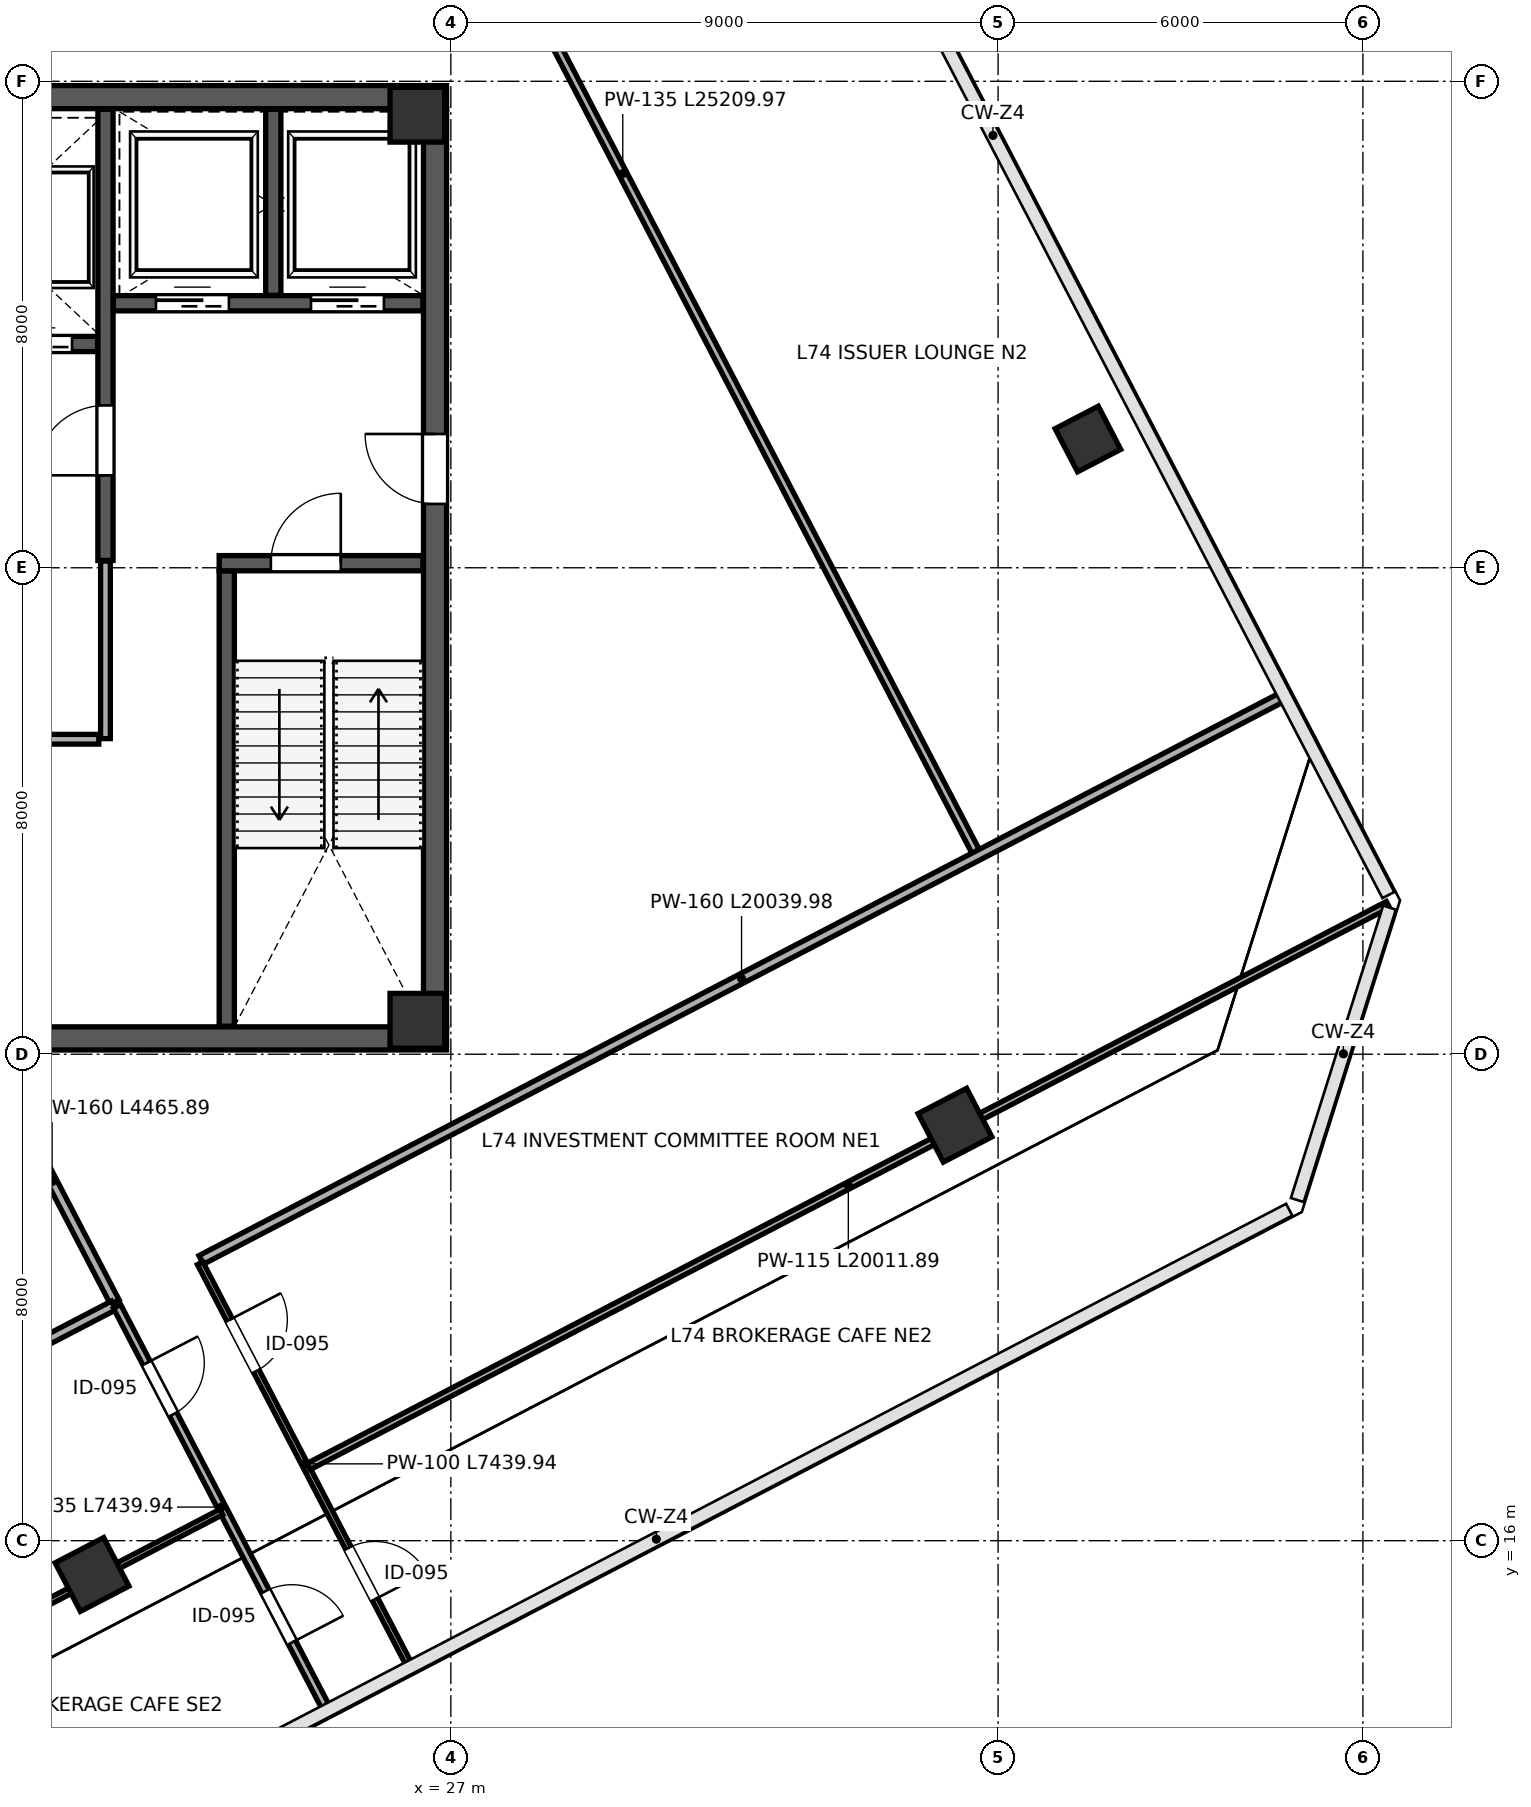
"""IFC4 building model, lengths in metres.
Left out: names, types, materials, properties, quantities, classifications, styles, units other than length and angle.
Written with IfcOpenShell. Run it as: python <this file> out.ifc"""

import sys

from ifc_helpers import new_model, si_unit, direction, frame, frame_2d, origin, origin_2d, place, context, subcontext, project, spatial, rectangle, extrude, source, transform, mapped, element, fill, save


model = new_model("IFC4")
c1 = context("Model", 3, precision=1e-05, world=origin(), true_north=direction((0.0, 1.0)))
c2 = subcontext(c1, "Body", "Model", "MODEL_VIEW")
j1 = project(units=[si_unit("LENGTHUNIT", "METRE"), si_unit("PLANEANGLEUNIT", "RADIAN")], contexts=[c1])
p1 = place(None, origin())
s1 = spatial("IfcSite", under=j1, at=p1, CompositionType="ELEMENT")
p2 = place(p1, origin())
s2 = spatial("IfcBuilding", under=s1, at=p2, CompositionType="ELEMENT")
p3 = place(p2, frame((0.0, 0.0, 328.2)))
s3 = spatial("IfcBuildingStorey", under=s2, at=p3, CompositionType="ELEMENT", Elevation=328.2)
m1 = source(origin(), c2, "Body", "SweptSolid", [
    extrude(rectangle(XDim=0.9, YDim=0.9, at=origin_2d()), origin(), (0.0, 0.0, 1.0), 4.198),
])
for number, where, z_axis, x_axis in (
    (1, (26.45, 24.55, 0.001), (0.0, 0.0, 1.0), (1.0, 0.0, 0.0)),
    (2, (26.45, 39.45, 0.001), (0.0, 0.0, 1.0), (1.0, 0.0, 0.0)),
):
    element("IfcColumn", number, at=place(p3, frame(where, z_axis=z_axis, x_axis=x_axis)), inside=s3, PredefinedType="COLUMN", context=c2, shape_type="MappedRepresentation", body=[
        mapped(m1, transform((0.0, 0.0, 0.0), scale=1.0)),
    ])
m2 = source(origin(), c2, "Body", "SweptSolid", [
    extrude(rectangle(XDim=0.8, YDim=0.8, at=origin_2d()), origin(), (0.0, 0.0, 1.0), 4.198),
])
p4 = place(p3, frame((37.478, 34.117, 0.001), z_axis=(0.0, 0.0, 1.0), x_axis=(-0.461748613235, 0.887010833178, 0.0)))
e3 = element("IfcColumn", 3, at=p4, inside=s3, PredefinedType="COLUMN", context=c2, shape_type="MappedRepresentation", body=[
    mapped(m2, transform((0.0, 0.0, 0.0), scale=1.0)),
])
m3 = source(origin(), c2, "Body", "SweptSolid", [
    extrude(rectangle(XDim=0.9, YDim=0.9, at=origin_2d()), origin(), (0.0, 0.0, 1.0), 4.198),
])
for number, where, z_axis, x_axis in (
    (4, (21.099, 15.444, 0.001), (0.0, 0.0, 1.0), (-0.462, 0.887, 0.0)),
    (5, (35.292, 22.832, 0.001), (0.0, 0.0, 1.0), (-0.462, 0.887, 0.0)),
):
    element("IfcColumn", number, at=place(p3, frame(where, z_axis=z_axis, x_axis=x_axis)), inside=s3, PredefinedType="COLUMN", context=c2, shape_type="MappedRepresentation", body=[
        mapped(m3, transform((0.0, 0.0, 0.0), scale=1.0)),
    ])
p5 = place(p3, frame((26.74, 24.45, 0.0), z_axis=(0.0, 0.0, 1.0), x_axis=(0.0, 1.0, 0.0)))
e6 = element("IfcWall", 6, at=p5, inside=s3, PredefinedType="SHEAR", context=c2, shape_type="SweptSolid", body=[
    extrude(rectangle(XDim=15.1, YDim=0.38, at=frame_2d((7.55, 0.0))), origin(), (0.0, 0.0, 1.0), 3.96),
])
p6 = place(p5, frame((8.6, 0.0, 0.0)))
e7 = element("IfcOpeningElement", 7, at=p6, cuts=e6, PredefinedType="OPENING", context=c2, shape_type="SweptSolid", body=[
    extrude(rectangle(XDim=1.15, YDim=2.2, at=frame_2d((0.575, 1.1))), frame((0.0, 0.2, 0.0), z_axis=(0.0, -1.0, 0.0), x_axis=(1.0, 0.0, 0.0)), (0.0, 0.0, 1.0), 0.4),
])
for number, where, z_axis, x_axis in (
    (8, (9.07, 24.26, 0.0), (0.0, 0.0, 1.0), (1.0, 0.0, 0.0)),
    (9, (9.07, 39.74, 0.0), (0.0, 0.0, 1.0), (1.0, 0.0, 0.0)),
):
    element("IfcWall", number, at=place(p3, frame(where, z_axis=z_axis, x_axis=x_axis)), inside=s3, PredefinedType="SHEAR", context=c2, shape_type="SweptSolid", body=[
        extrude(rectangle(XDim=17.86, YDim=0.38, at=frame_2d((8.93, 0.0))), origin(), (0.0, 0.0, 1.0), 3.96),
    ])
p7 = place(p3, frame((23.315, 24.46, 0.0), z_axis=(0.0, 0.0, 1.0), x_axis=(0.0, 1.0, 0.0)))
e10 = element("IfcWall", 10, at=p7, inside=s3, PredefinedType="SHEAR", context=c2, shape_type="SweptSolid", body=[
    extrude(rectangle(XDim=7.49, YDim=0.25, at=frame_2d((3.745, 0.0))), origin(), (0.0, 0.0, 1.0), 3.96),
])
p8 = place(p3, frame((23.19, 32.075, 0.0), z_axis=(0.0, 0.0, 1.0), x_axis=(1.0, 0.0, 0.0)))
e11 = element("IfcWall", 11, at=p8, inside=s3, PredefinedType="SHEAR", context=c2, shape_type="SweptSolid", body=[
    extrude(rectangle(XDim=3.35, YDim=0.25, at=frame_2d((1.675, 0.0))), origin(), (0.0, 0.0, 1.0), 3.96),
])
p9 = place(p8, frame((0.85, 0.0, 0.0)))
e12 = element("IfcOpeningElement", 12, at=p9, cuts=e11, PredefinedType="OPENING", context=c2, shape_type="SweptSolid", body=[
    extrude(rectangle(XDim=1.15, YDim=2.2, at=frame_2d((0.575, 1.1))), frame((0.0, 0.135, 0.0), z_axis=(0.0, -1.0, 0.0), x_axis=(1.0, 0.0, 0.0)), (0.0, 0.0, 1.0), 0.27),
])
p10 = place(p3, frame((21.32, 32.12, 0.0), z_axis=(0.0, 0.0, 1.0), x_axis=(0.0, 1.0, 0.0)))
e13 = element("IfcWall", 13, at=p10, inside=s3, PredefinedType="SHEAR", context=c2, shape_type="SweptSolid", body=[
    extrude(rectangle(XDim=7.42, YDim=0.25, at=frame_2d((3.71, 0.0))), origin(), (0.0, 0.0, 1.0), 3.96),
])
p11 = place(p10, frame((1.4, 0.0, 0.0)))
e14 = element("IfcOpeningElement", 14, at=p11, cuts=e13, PredefinedType="OPENING", context=c2, shape_type="SweptSolid", body=[
    extrude(rectangle(XDim=1.15, YDim=2.2, at=frame_2d((0.575, 1.1))), frame((0.0, 0.135, 0.0), z_axis=(0.0, -1.0, 0.0), x_axis=(1.0, 0.0, 0.0)), (0.0, 0.0, 1.0), 0.27),
])
p12 = place(p3, frame((21.45, 36.35, 0.0), z_axis=(0.0, 0.0, 1.0), x_axis=(1.0, 0.0, 0.0)))
e15 = element("IfcWall", 15, at=p12, inside=s3, PredefinedType="SHEAR", context=c2, shape_type="SweptSolid", body=[
    extrude(rectangle(XDim=5.09, YDim=0.25, at=frame_2d((2.545, 0.0))), origin(), (0.0, 0.0, 1.0), 3.96),
])
p13 = place(p12, frame((0.7, 0.0, 0.0)))
e16 = element("IfcOpeningElement", 16, at=p13, cuts=e15, PredefinedType="OPENING", context=c2, shape_type="SweptSolid", body=[
    extrude(rectangle(XDim=1.2, YDim=2.2, at=frame_2d((0.6, 1.1))), frame((0.0, 0.135, 0.0), z_axis=(0.0, -1.0, 0.0), x_axis=(1.0, 0.0, 0.0)), (0.0, 0.0, 1.0), 0.27),
])
p14 = place(p12, frame((3.25, 0.0, 0.0)))
e17 = element("IfcOpeningElement", 17, at=p14, cuts=e15, PredefinedType="OPENING", context=c2, shape_type="SweptSolid", body=[
    extrude(rectangle(XDim=1.2, YDim=2.2, at=frame_2d((0.6, 1.1))), frame((0.0, 0.135, 0.0), z_axis=(0.0, -1.0, 0.0), x_axis=(1.0, 0.0, 0.0)), (0.0, 0.0, 1.0), 0.27),
])
p15 = place(p3, frame((24.08, 36.48, 0.0), z_axis=(0.0, 0.0, 1.0), x_axis=(0.0, 1.0, 0.0)))
e18 = element("IfcWall", 18, at=p15, inside=s3, PredefinedType="SHEAR", context=c2, shape_type="SweptSolid", body=[
    extrude(rectangle(XDim=3.06, YDim=0.25, at=frame_2d((1.53, 0.0))), origin(), (0.0, 0.0, 1.0), 3.96),
])
p16 = place(p3, frame((17.32, 35.68, 0.0), z_axis=(0.0, 0.0, 1.0), x_axis=(1.0, 0.0, 0.0)))
e19 = element("IfcWall", 19, at=p16, inside=s3, PredefinedType="SHEAR", context=c2, shape_type="SweptSolid", body=[
    extrude(rectangle(XDim=3.87, YDim=0.25, at=frame_2d((1.935, 0.0))), origin(), (0.0, 0.0, 1.0), 3.96),
])
p17 = place(p16, frame((0.45, 0.0, 0.0)))
e20 = element("IfcOpeningElement", 20, at=p17, cuts=e19, PredefinedType="OPENING", context=c2, shape_type="SweptSolid", body=[
    extrude(rectangle(XDim=1.1, YDim=2.2, at=frame_2d((0.55, 1.1))), frame((0.0, 0.135, 0.0), z_axis=(0.0, -1.0, 0.0), x_axis=(1.0, 0.0, 0.0)), (0.0, 0.0, 1.0), 0.27),
])
p18 = place(p16, frame((2.35, 0.0, 0.0)))
e21 = element("IfcOpeningElement", 21, at=p18, cuts=e19, PredefinedType="OPENING", context=c2, shape_type="SweptSolid", body=[
    extrude(rectangle(XDim=1.1, YDim=2.2, at=frame_2d((0.55, 1.1))), frame((0.0, 0.135, 0.0), z_axis=(0.0, -1.0, 0.0), x_axis=(1.0, 0.0, 0.0)), (0.0, 0.0, 1.0), 0.27),
])
p19 = place(p3, frame((12.84, 29.18, 0.0), z_axis=(0.0, 0.0, 1.0), x_axis=(1.0, 0.0, 0.0)))
e22 = element("IfcWall", 22, at=p19, inside=s3, PredefinedType="PARTITIONING", context=c2, shape_type="SweptSolid", body=[
    extrude(rectangle(XDim=8.37, YDim=0.16, at=frame_2d((4.185, 0.0))), origin(), (0.0, 0.0, 1.0), 3.96),
])
p20 = place(p19, frame((2.1, 0.0, 0.0)))
e23 = element("IfcOpeningElement", 23, at=p20, cuts=e22, PredefinedType="OPENING", context=c2, shape_type="SweptSolid", body=[
    extrude(rectangle(XDim=0.9, YDim=2.15, at=frame_2d((0.45, 1.075))), frame((0.0, 0.09, 0.0), z_axis=(0.0, -1.0, 0.0), x_axis=(1.0, 0.0, 0.0)), (0.0, 0.0, 1.0), 0.18),
])
p21 = place(p19, frame((6.2, 0.0, 0.0)))
e24 = element("IfcOpeningElement", 24, at=p21, cuts=e22, PredefinedType="OPENING", context=c2, shape_type="SweptSolid", body=[
    extrude(rectangle(XDim=0.85, YDim=2.1, at=frame_2d((0.425, 1.05))), frame((0.0, 0.09, 0.0), z_axis=(0.0, -1.0, 0.0), x_axis=(1.0, 0.0, 0.0)), (0.0, 0.0, 1.0), 0.18),
])
p22 = place(p3, frame((21.32, 29.19, 0.0), z_axis=(0.0, 0.0, 1.0), x_axis=(0.0, 1.0, 0.0)))
e25 = element("IfcWall", 25, at=p22, inside=s3, PredefinedType="PARTITIONING", context=c2, shape_type="SweptSolid", body=[
    extrude(rectangle(XDim=2.92, YDim=0.16, at=frame_2d((1.46, 0.0))), origin(), (0.0, 0.0, 1.0), 3.96),
])
p23 = place(p3, frame((19.411, 23.885, 0.0), z_axis=(0.0, 0.0, 1.0), x_axis=(0.461717603384, -0.887026975196, 0.0)))
e26 = element("IfcWall", 26, at=p23, inside=s3, PredefinedType="PARTITIONING", context=c2, shape_type="SweptSolid", body=[
    extrude(rectangle(XDim=4.466, YDim=0.16, at=frame_2d((2.233, 0.0))), origin(), (0.0, 0.0, 1.0), 3.96),
])
p24 = place(p3, frame((24.007, 49.664, 0.0), z_axis=(0.0, 0.0, 1.0), x_axis=(0.461753963132, -0.887008048178, 0.0)))
e27 = element("IfcWall", 27, at=p24, inside=s3, PredefinedType="PARTITIONING", context=c2, shape_type="SweptSolid", body=[
    extrude(rectangle(XDim=25.21, YDim=0.135, at=frame_2d((12.605, 0.0))), origin(), (0.0, 0.0, 1.0), 3.96),
])
p25 = place(p24, frame((4.3, 0.0, 0.0)))
e28 = element("IfcOpeningElement", 28, at=p25, cuts=e27, PredefinedType="OPENING", context=c2, shape_type="SweptSolid", body=[
    extrude(rectangle(XDim=0.95, YDim=2.15, at=frame_2d((0.475, 1.075))), frame((0.0, 0.078, 0.0), z_axis=(0.0, -1.0, 0.0), x_axis=(1.0, 0.0, 0.0)), (0.0, 0.0, 1.0), 0.155),
])
p26 = place(p24, frame((8.3, 0.0, 0.0)))
e29 = element("IfcOpeningElement", 29, at=p26, cuts=e27, PredefinedType="OPENING", context=c2, shape_type="SweptSolid", body=[
    extrude(rectangle(XDim=0.95, YDim=2.15, at=frame_2d((0.475, 1.075))), frame((0.0, 0.078, 0.0), z_axis=(0.0, -1.0, 0.0), x_axis=(1.0, 0.0, 0.0)), (0.0, 0.0, 1.0), 0.155),
])
p27 = place(p3, frame((22.893, 20.617, 0.0), z_axis=(0.0, 0.0, 1.0), x_axis=(0.887013262899, 0.461743945755, 0.0)))
e30 = element("IfcWall", 30, at=p27, inside=s3, PredefinedType="PARTITIONING", context=c2, shape_type="SweptSolid", body=[
    extrude(rectangle(XDim=20.04, YDim=0.16, at=frame_2d((10.02, 0.0))), origin(), (0.0, 0.0, 1.0), 3.96),
])
p28 = place(p3, frame((13.136, 15.538, 0.0), z_axis=(0.0, 0.0, 1.0), x_axis=(0.887015145491, 0.461740329265, 0.0)))
e31 = element("IfcWall", 31, at=p28, inside=s3, PredefinedType="PARTITIONING", context=c2, shape_type="SweptSolid", body=[
    extrude(rectangle(XDim=9.38, YDim=0.16, at=frame_2d((4.69, 0.0))), origin(), (0.0, 0.0, 1.0), 3.96),
])
p29 = place(p3, frame((22.876, 20.563, 0.0), z_axis=(0.0, 0.0, 1.0), x_axis=(0.461750488306, -0.887009857076, 0.0)))
e32 = element("IfcWall", 32, at=p29, inside=s3, PredefinedType="PARTITIONING", context=c2, shape_type="SweptSolid", body=[
    extrude(rectangle(XDim=7.44, YDim=0.1, at=frame_2d((3.72, 0.0))), origin(), (0.0, 0.0, 1.0), 3.252),
])
p30 = place(p29, frame((1.05, 0.0, 0.0)))
e33 = element("IfcOpeningElement", 33, at=p30, cuts=e32, PredefinedType="OPENING", context=c2, shape_type="SweptSolid", body=[
    extrude(rectangle(XDim=0.95, YDim=2.15, at=frame_2d((0.475, 1.075))), frame((0.0, 0.06, 0.0), z_axis=(0.0, -1.0, 0.0), x_axis=(1.0, 0.0, 0.0)), (0.0, 0.0, 1.0), 0.12),
])
p31 = place(p29, frame((5.28, 0.0, 0.0)))
e34 = element("IfcOpeningElement", 34, at=p31, cuts=e32, PredefinedType="OPENING", context=c2, shape_type="SweptSolid", body=[
    extrude(rectangle(XDim=0.95, YDim=2.15, at=frame_2d((0.475, 1.075))), frame((0.0, 0.06, 0.0), z_axis=(0.0, -1.0, 0.0), x_axis=(1.0, 0.0, 0.0)), (0.0, 0.0, 1.0), 0.12),
])
p32 = place(p3, frame((21.51, 19.852, 0.0), z_axis=(0.0, 0.0, 1.0), x_axis=(0.461737048058, -0.887016853532, 0.0)))
e35 = element("IfcWall", 35, at=p32, inside=s3, PredefinedType="PARTITIONING", context=c2, shape_type="SweptSolid", body=[
    extrude(rectangle(XDim=7.44, YDim=0.135, at=frame_2d((3.72, 0.0))), origin(), (0.0, 0.0, 1.0), 3.252),
])
p33 = place(p32, frame((1.05, 0.0, 0.0)))
e36 = element("IfcOpeningElement", 36, at=p33, cuts=e35, PredefinedType="OPENING", context=c2, shape_type="SweptSolid", body=[
    extrude(rectangle(XDim=0.95, YDim=2.15, at=frame_2d((0.475, 1.075))), frame((0.0, 0.078, 0.0), z_axis=(0.0, -1.0, 0.0), x_axis=(1.0, 0.0, 0.0)), (0.0, 0.0, 1.0), 0.155),
])
p34 = place(p32, frame((5.28, 0.0, 0.0)))
e37 = element("IfcOpeningElement", 37, at=p34, cuts=e35, PredefinedType="OPENING", context=c2, shape_type="SweptSolid", body=[
    extrude(rectangle(XDim=0.95, YDim=2.15, at=frame_2d((0.475, 1.075))), frame((0.0, 0.078, 0.0), z_axis=(0.0, -1.0, 0.0), x_axis=(1.0, 0.0, 0.0)), (0.0, 0.0, 1.0), 0.155),
])
p35 = place(p3, frame((24.662, 17.22, 0.0), z_axis=(0.0, 0.0, 1.0), x_axis=(0.887015173056, 0.461740276312, 0.0)))
e38 = element("IfcWall", 38, at=p35, inside=s3, PredefinedType="PARTITIONING", context=c2, shape_type="SweptSolid", body=[
    extrude(rectangle(XDim=20.012, YDim=0.115, at=frame_2d((10.006, 0.0))), origin(), (0.0, 0.0, 1.0), 2.795),
])
p36 = place(p3, frame((14.93, 12.154, 0.0), z_axis=(0.0, 0.0, 1.0), x_axis=(0.887014112301, 0.461742314044, 0.0)))
e39 = element("IfcWall", 39, at=p36, inside=s3, PredefinedType="PARTITIONING", context=c2, shape_type="SweptSolid", body=[
    extrude(rectangle(XDim=9.352, YDim=0.1, at=frame_2d((4.676, 0.0))), origin(), (0.0, 0.0, 1.0), 2.795),
])
m4 = source(origin(), c2, "Body", "SweptSolid", [
    extrude(rectangle(XDim=1.15, YDim=2.2, at=frame_2d((0.575, 1.1))), frame((0.0, 0.025, 0.0), z_axis=(0.0, -1.0, 0.0), x_axis=(1.0, 0.0, 0.0)), (0.0, 0.0, 1.0), 0.05),
])
p37 = place(p11, origin())
e40 = element("IfcDoor", 40, at=p37, inside=s3, OperationType="SINGLE_SWING_LEFT", PredefinedType="DOOR", context=c2, shape_type="MappedRepresentation", body=[
    mapped(m4, transform((0.0, 0.0, 0.0), scale=1.0)),
])
fill(e14, e40)
m5 = source(origin(), c2, "Body", "SweptSolid", [
    extrude(rectangle(XDim=1.15, YDim=2.2, at=frame_2d((0.575, 1.1))), frame((0.0, 0.025, 0.0), z_axis=(0.0, -1.0, 0.0), x_axis=(1.0, 0.0, 0.0)), (0.0, 0.0, 1.0), 0.05),
])
p38 = place(p9, origin())
e41 = element("IfcDoor", 41, at=p38, inside=s3, OperationType="SINGLE_SWING_RIGHT", PredefinedType="DOOR", context=c2, shape_type="MappedRepresentation", body=[
    mapped(m5, transform((0.0, 0.0, 0.0), scale=1.0)),
])
fill(e12, e41)
p39 = place(p6, origin())
e42 = element("IfcDoor", 42, at=p39, inside=s3, OperationType="SINGLE_SWING_RIGHT", PredefinedType="DOOR", context=c2, shape_type="MappedRepresentation", body=[
    mapped(m4, transform((0.0, 0.0, 0.0), scale=1.0)),
])
fill(e7, e42)
m6 = source(origin(), c2, "Body", "SweptSolid", [
    extrude(rectangle(XDim=1.1, YDim=2.2, at=frame_2d((0.55, 1.1))), frame((0.0, 0.025, 0.0), z_axis=(0.0, -1.0, 0.0), x_axis=(1.0, 0.0, 0.0)), (0.0, 0.0, 1.0), 0.05),
])
p40 = place(p18, origin())
e43 = element("IfcDoor", 43, at=p40, inside=s3, OperationType="SLIDING_TO_RIGHT", PredefinedType="DOOR", context=c2, shape_type="MappedRepresentation", body=[
    mapped(m6, transform((0.0, 0.0, 0.0), scale=1.0)),
])
fill(e21, e43)
m7 = source(origin(), c2, "Body", "SweptSolid", [
    extrude(rectangle(XDim=1.2, YDim=2.2, at=frame_2d((0.6, 1.1))), frame((0.0, 0.025, 0.0), z_axis=(0.0, -1.0, 0.0), x_axis=(1.0, 0.0, 0.0)), (0.0, 0.0, 1.0), 0.05),
])
p41 = place(p13, origin())
e44 = element("IfcDoor", 44, at=p41, inside=s3, OperationType="SLIDING_TO_LEFT", PredefinedType="DOOR", context=c2, shape_type="MappedRepresentation", body=[
    mapped(m7, transform((0.0, 0.0, 0.0), scale=1.0)),
])
fill(e16, e44)
p42 = place(p14, origin())
e45 = element("IfcDoor", 45, at=p42, inside=s3, OperationType="SLIDING_TO_RIGHT", PredefinedType="DOOR", context=c2, shape_type="MappedRepresentation", body=[
    mapped(m7, transform((0.0, 0.0, 0.0), scale=1.0)),
])
fill(e17, e45)
m8 = source(origin(), c2, "Body", "SweptSolid", [
    extrude(rectangle(XDim=0.95, YDim=2.15, at=frame_2d((0.475, 1.075))), frame((0.0, 0.025, 0.0), z_axis=(0.0, -1.0, 0.0), x_axis=(1.0, 0.0, 0.0)), (0.0, 0.0, 1.0), 0.05),
])
p43 = place(p30, origin())
e46 = element("IfcDoor", 46, at=p43, inside=s3, OperationType="SINGLE_SWING_LEFT", PredefinedType="DOOR", context=c2, shape_type="MappedRepresentation", body=[
    mapped(m8, transform((0.0, 0.0, 0.0), scale=1.0)),
])
fill(e33, e46)
p44 = place(p31, origin())
e47 = element("IfcDoor", 47, at=p44, inside=s3, OperationType="SINGLE_SWING_RIGHT", PredefinedType="DOOR", context=c2, shape_type="MappedRepresentation", body=[
    mapped(m8, transform((0.0, 0.0, 0.0), scale=1.0)),
])
fill(e34, e47)
p45 = place(p33, origin())
e48 = element("IfcDoor", 48, at=p45, inside=s3, OperationType="SINGLE_SWING_LEFT", PredefinedType="DOOR", context=c2, shape_type="MappedRepresentation", body=[
    mapped(m8, transform((0.0, 0.0, 0.0), scale=1.0)),
])
fill(e36, e48)
p46 = place(p34, origin())
e49 = element("IfcDoor", 49, at=p46, inside=s3, OperationType="SINGLE_SWING_RIGHT", PredefinedType="DOOR", context=c2, shape_type="MappedRepresentation", body=[
    mapped(m8, transform((0.0, 0.0, 0.0), scale=1.0)),
])
fill(e37, e49)
save(model, sys.argv[1])
